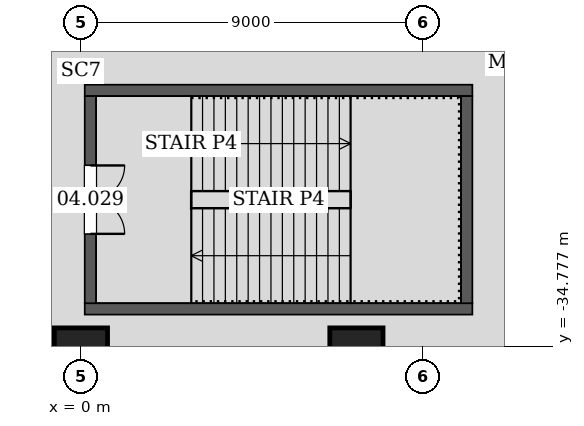
"""IFC4 building model, lengths in metres.
Left out: names, types, materials, properties, quantities, classifications, styles, units other than length and angle.
Written with IfcOpenShell. Run it as: python <this file> out.ifc"""

import sys

from ifc_helpers import new_model, si_unit, direction, frame, frame_2d, origin, origin_2d, place, context, subcontext, project, spatial, rectangle, extrude, element, fill, save


model = new_model("IFC4")
c1 = context("Model", 3, precision=1e-05, world=origin(), true_north=direction((0.0, 1.0)))
c2 = subcontext(c1, "Body", "Model", "MODEL_VIEW")
j1 = project(units=[si_unit("LENGTHUNIT", "METRE"), si_unit("PLANEANGLEUNIT", "RADIAN")], contexts=[c1])
p1 = place(None, origin())
s1 = spatial("IfcSite", under=j1, at=p1, CompositionType="ELEMENT")
p2 = place(p1, origin())
s2 = spatial("IfcBuilding", under=s1, at=p2, CompositionType="ELEMENT")
p3 = place(p2, frame((0.0, 0.0, 24.0)))
s3 = spatial("IfcBuildingStorey", under=s2, at=p3, CompositionType="ELEMENT", Elevation=24.0)
for number, where, z_axis, x_axis in (
    (1, (0.0, -35.0, 0.0), (0.0, 0.0, 1.0), (1.0, 0.0, 0.0)),
    (2, (7.249, -35.0, 0.0), (0.0, 0.0, 1.0), (1.0, 0.0, 0.0)),
):
    element("IfcColumn", number, at=place(p3, frame(where, z_axis=z_axis, x_axis=x_axis)), inside=s3, PredefinedType="COLUMN", context=c2, shape_type="SweptSolid", body=[
        extrude(rectangle(XDim=1.4, YDim=1.4, at=origin_2d()), origin(), (0.0, 0.0, 1.0), 4.8),
    ])
for number, where, z_axis, x_axis in (
    (3, (0.1, -33.8, 0.0), (0.0, 0.0, 1.0), (1.0, 0.0, 0.0)),
    (4, (10.3, -28.05, 0.0), (0.0, 0.0, 1.0), (-1.0, 0.0, 0.0)),
):
    element("IfcWall", number, at=place(p3, frame(where, z_axis=z_axis, x_axis=x_axis)), inside=s3, PredefinedType="SOLIDWALL", context=c2, shape_type="SweptSolid", body=[
        extrude(rectangle(XDim=10.2, YDim=0.3, at=frame_2d((5.1, 0.0))), origin(), (0.0, 0.0, 1.0), 4.8),
    ])
p4 = place(p3, frame((0.25, -28.2, 0.0), z_axis=(0.0, 0.0, 1.0), x_axis=(0.0, -1.0, 0.0)))
e5 = element("IfcWall", 5, at=p4, inside=s3, PredefinedType="SOLIDWALL", context=c2, shape_type="SweptSolid", body=[
    extrude(rectangle(XDim=5.45, YDim=0.3, at=frame_2d((2.725, 0.0))), origin(), (0.0, 0.0, 1.0), 4.8),
])
p5 = place(p4, frame((1.825, 0.0, 0.0)))
e6 = element("IfcOpeningElement", 6, at=p5, cuts=e5, PredefinedType="OPENING", context=c2, shape_type="SweptSolid", body=[
    extrude(rectangle(XDim=1.8, YDim=2.1, at=frame_2d((0.9, 1.05))), frame((0.0, 0.16, 0.0), z_axis=(0.0, -1.0, 0.0), x_axis=(1.0, 0.0, 0.0)), (0.0, 0.0, 1.0), 0.32),
])
p6 = place(p3, frame((10.15, -33.65, 0.0), z_axis=(0.0, 0.0, 1.0), x_axis=(0.0, 1.0, 0.0)))
e7 = element("IfcWall", 7, at=p6, inside=s3, PredefinedType="SOLIDWALL", context=c2, shape_type="SweptSolid", body=[
    extrude(rectangle(XDim=5.45, YDim=0.3, at=frame_2d((2.725, 0.0))), origin(), (0.0, 0.0, 1.0), 4.8),
])
p7 = place(p5, origin())
e8 = element("IfcDoor", 8, at=p7, inside=s3, OperationType="DOUBLE_DOOR_SINGLE_SWING", PredefinedType="DOOR", context=c2, shape_type="SweptSolid", body=[
    extrude(rectangle(XDim=1.8, YDim=2.1, at=frame_2d((0.9, 1.05))), frame((0.0, 0.025, 0.0), z_axis=(0.0, -1.0, 0.0), x_axis=(1.0, 0.0, 0.0)), (0.0, 0.0, 1.0), 0.05),
])
fill(e6, e8)
save(model, sys.argv[1])
